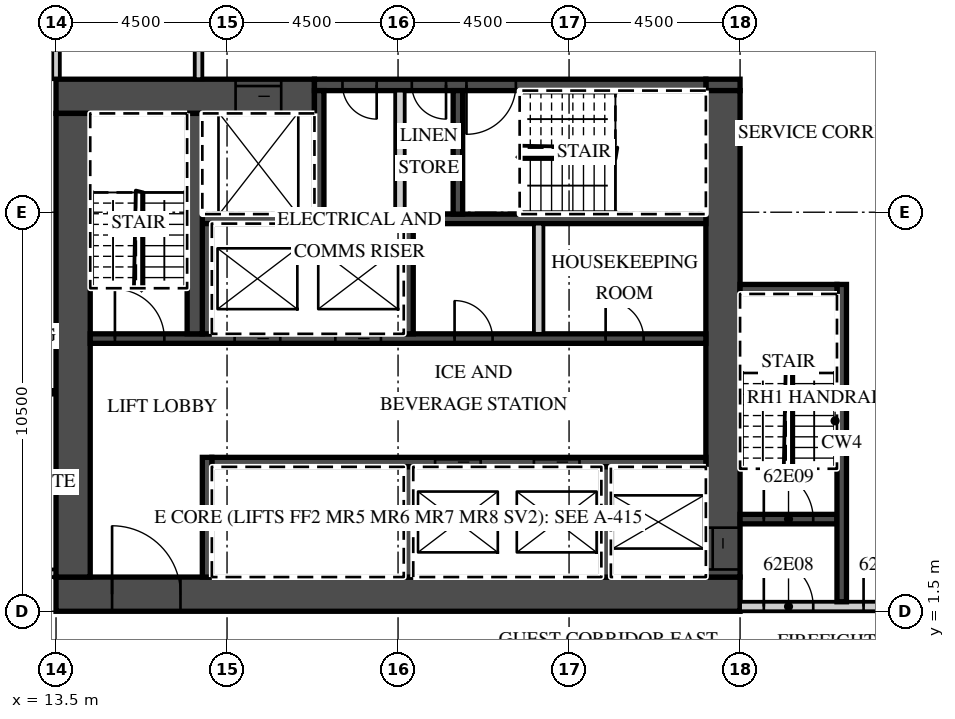
"""IFC4 building model, lengths in metres.
Left out: names, types, materials, properties, quantities, classifications, styles, units other than length and angle.
Written with IfcOpenShell. Run it as: python <this file> out.ifc"""

import sys

from ifc_helpers import new_model, si_unit, direction, frame, frame_2d, origin, place, context, subcontext, project, spatial, rectangle, extrude, element, fill, save


model = new_model("IFC4")
c1 = context("Model", 3, precision=1e-05, world=origin(), true_north=direction((0.0, 1.0)))
c2 = subcontext(c1, "Body", "Model", "MODEL_VIEW")
j1 = project(units=[si_unit("LENGTHUNIT", "METRE"), si_unit("PLANEANGLEUNIT", "RADIAN")], contexts=[c1])
p1 = place(None, origin())
s1 = spatial("IfcSite", under=j1, at=p1, CompositionType="ELEMENT")
p2 = place(p1, origin())
s2 = spatial("IfcBuilding", under=s1, at=p2, CompositionType="ELEMENT")
p3 = place(p2, frame((0.0, 0.0, 250.7)))
s3 = spatial("IfcBuildingStorey", under=s2, at=p3, CompositionType="ELEMENT", Elevation=250.7)
p4 = place(p3, frame((13.5, 15.5, 0.0), z_axis=(0.0, 0.0, 1.0), x_axis=(0.0, 1.0, 0.0)))
e1 = element("IfcWall", 1, at=p4, inside=s3, PredefinedType="PARTITIONING", context=c2, shape_type="SweptSolid", body=[
    extrude(rectangle(XDim=5.436, YDim=0.2, at=frame_2d((2.718, 0.0))), origin(), (0.0, 0.0, 1.0), 3.02),
])
p5 = place(p3, frame((-13.5, 2.5, 0.0), z_axis=(0.0, 0.0, 1.0), x_axis=(1.0, 0.0, 0.0)))
e2 = element("IfcWall", 2, at=p5, inside=s3, PredefinedType="PARTITIONING", context=c2, shape_type="SweptSolid", body=[
    extrude(rectangle(XDim=27.0, YDim=0.2, at=frame_2d((13.5, 0.0))), origin(), (0.0, 0.0, 1.0), 3.02),
])
p6 = place(p5, frame((0.575, 0.0, 0.0)))
e3 = element("IfcOpeningElement", 3, at=p6, cuts=e2, PredefinedType="OPENING", context=c2, shape_type="SweptSolid", body=[
    extrude(rectangle(XDim=1.0, YDim=2.1, at=frame_2d((0.5, 1.05))), frame((0.0, 0.11, 0.0), z_axis=(0.0, -1.0, 0.0), x_axis=(1.0, 0.0, 0.0)), (0.0, 0.0, 1.0), 0.22),
])
p7 = place(p5, frame((7.45, 0.0, 0.0)))
e4 = element("IfcOpeningElement", 4, at=p7, cuts=e2, PredefinedType="OPENING", context=c2, shape_type="SweptSolid", body=[
    extrude(rectangle(XDim=1.0, YDim=2.1, at=frame_2d((0.5, 1.05))), frame((0.0, 0.11, 0.0), z_axis=(0.0, -1.0, 0.0), x_axis=(1.0, 0.0, 0.0)), (0.0, 0.0, 1.0), 0.22),
])
p8 = place(p5, frame((11.925, 0.0, 0.0)))
e5 = element("IfcOpeningElement", 5, at=p8, cuts=e2, PredefinedType="OPENING", context=c2, shape_type="SweptSolid", body=[
    extrude(rectangle(XDim=1.0, YDim=2.1, at=frame_2d((0.5, 1.05))), frame((0.0, 0.11, 0.0), z_axis=(0.0, -1.0, 0.0), x_axis=(1.0, 0.0, 0.0)), (0.0, 0.0, 1.0), 0.22),
])
p9 = place(p5, frame((18.862, 0.0, 0.0)))
e6 = element("IfcOpeningElement", 6, at=p9, cuts=e2, PredefinedType="OPENING", context=c2, shape_type="SweptSolid", body=[
    extrude(rectangle(XDim=1.2, YDim=2.1, at=frame_2d((0.6, 1.05))), frame((0.0, 0.11, 0.0), z_axis=(0.0, -1.0, 0.0), x_axis=(1.0, 0.0, 0.0)), (0.0, 0.0, 1.0), 0.22),
])
p10 = place(p5, frame((23.075, 0.0, 0.0)))
e7 = element("IfcOpeningElement", 7, at=p10, cuts=e2, PredefinedType="OPENING", context=c2, shape_type="SweptSolid", body=[
    extrude(rectangle(XDim=1.0, YDim=2.1, at=frame_2d((0.5, 1.05))), frame((0.0, 0.11, 0.0), z_axis=(0.0, -1.0, 0.0), x_axis=(1.0, 0.0, 0.0)), (0.0, 0.0, 1.0), 0.22),
])
p11 = place(p3, frame((13.5, 1.95, 0.0), z_axis=(0.0, 0.0, 1.0), x_axis=(1.0, 0.0, 0.0)))
e8 = element("IfcWall", 8, at=p11, inside=s3, PredefinedType="SHEAR", context=c2, shape_type="SweptSolid", body=[
    extrude(rectangle(XDim=18.0, YDim=0.9, at=frame_2d((9.0, 0.0))), origin(), (0.0, 0.0, 1.0), 3.02),
])
p12 = place(p11, frame((1.475, 0.0, 0.0)))
e9 = element("IfcOpeningElement", 9, at=p12, cuts=e8, PredefinedType="OPENING", context=c2, shape_type="SweptSolid", body=[
    extrude(rectangle(XDim=1.8, YDim=2.1, at=frame_2d((0.9, 1.05))), frame((0.0, 0.46, 0.0), z_axis=(0.0, -1.0, 0.0), x_axis=(1.0, 0.0, 0.0)), (0.0, 0.0, 1.0), 0.92),
])
p13 = place(p3, frame((13.5, 15.05, 0.0), z_axis=(0.0, 0.0, 1.0), x_axis=(1.0, 0.0, 0.0)))
e10 = element("IfcWall", 10, at=p13, inside=s3, PredefinedType="SHEAR", context=c2, shape_type="SweptSolid", body=[
    extrude(rectangle(XDim=6.8, YDim=0.9, at=frame_2d((3.4, 0.0))), origin(), (0.0, 0.0, 1.0), 3.02),
])
p14 = place(p13, frame((4.725, 0.0, 0.0)))
e11 = element("IfcOpeningElement", 11, at=p14, cuts=e10, PredefinedType="OPENING", context=c2, shape_type="SweptSolid", body=[
    extrude(rectangle(XDim=1.2, YDim=2.1, at=frame_2d((0.6, 1.05))), frame((0.0, 0.46, 0.0), z_axis=(0.0, -1.0, 0.0), x_axis=(1.0, 0.0, 0.0)), (0.0, 0.0, 1.0), 0.92),
])
p15 = place(p3, frame((30.6, 15.35, 0.0), z_axis=(0.0, 0.0, 1.0), x_axis=(1.0, 0.0, 0.0)))
e12 = element("IfcWall", 12, at=p15, inside=s3, PredefinedType="SHEAR", context=c2, shape_type="SweptSolid", body=[
    extrude(rectangle(XDim=0.9, YDim=0.3, at=frame_2d((0.45, 0.0))), origin(), (0.0, 0.0, 1.0), 3.02),
])
p16 = place(p3, frame((20.3, 15.35, 0.0), z_axis=(0.0, 0.0, 1.0), x_axis=(1.0, 0.0, 0.0)))
e13 = element("IfcWall", 13, at=p16, inside=s3, PredefinedType="SHEAR", context=c2, shape_type="SweptSolid", body=[
    extrude(rectangle(XDim=10.3, YDim=0.3, at=frame_2d((5.15, 0.0))), origin(), (0.0, 0.0, 1.0), 3.02),
])
p17 = place(p16, frame((4.0, 0.0, 0.0)))
e14 = element("IfcOpeningElement", 14, at=p17, cuts=e13, PredefinedType="OPENING", context=c2, shape_type="SweptSolid", body=[
    extrude(rectangle(XDim=1.3, YDim=2.1, at=frame_2d((0.65, 1.05))), frame((0.0, 0.16, 0.0), z_axis=(0.0, -1.0, 0.0), x_axis=(1.0, 0.0, 0.0)), (0.0, 0.0, 1.0), 0.32),
])
p18 = place(p16, frame((2.562, 0.0, 0.0)))
e15 = element("IfcOpeningElement", 15, at=p18, cuts=e13, PredefinedType="OPENING", context=c2, shape_type="SweptSolid", body=[
    extrude(rectangle(XDim=0.9, YDim=2.1, at=frame_2d((0.45, 1.05))), frame((0.0, 0.16, 0.0), z_axis=(0.0, -1.0, 0.0), x_axis=(1.0, 0.0, 0.0)), (0.0, 0.0, 1.0), 0.32),
])
p19 = place(p16, frame((0.738, 0.0, 0.0)))
e16 = element("IfcOpeningElement", 16, at=p19, cuts=e13, PredefinedType="OPENING", context=c2, shape_type="SweptSolid", body=[
    extrude(rectangle(XDim=0.9, YDim=2.1, at=frame_2d((0.45, 1.05))), frame((0.0, 0.16, 0.0), z_axis=(0.0, -1.0, 0.0), x_axis=(1.0, 0.0, 0.0)), (0.0, 0.0, 1.0), 0.32),
])
p20 = place(p3, frame((31.05, 2.4, 0.0), z_axis=(0.0, 0.0, 1.0), x_axis=(0.0, 1.0, 0.0)))
e17 = element("IfcWall", 17, at=p20, inside=s3, PredefinedType="SHEAR", context=c2, shape_type="SweptSolid", body=[
    extrude(rectangle(XDim=12.8, YDim=0.9, at=frame_2d((6.4, 0.0))), origin(), (0.0, 0.0, 1.0), 3.02),
])
p21 = place(p20, frame((0.2, 0.0, 0.0)))
e18 = element("IfcOpeningElement", 18, at=p21, cuts=e17, PredefinedType="OPENING", context=c2, shape_type="SweptSolid", body=[
    extrude(rectangle(XDim=1.1, YDim=2.1, at=frame_2d((0.55, 1.05))), frame((0.0, 0.46, 0.0), z_axis=(0.0, -1.0, 0.0), x_axis=(1.0, 0.0, 0.0)), (0.0, 0.0, 1.0), 0.92),
])
p22 = place(p3, frame((13.95, 2.4, 0.0), z_axis=(0.0, 0.0, 1.0), x_axis=(0.0, 1.0, 0.0)))
e19 = element("IfcWall", 19, at=p22, inside=s3, PredefinedType="SHEAR", context=c2, shape_type="SweptSolid", body=[
    extrude(rectangle(XDim=12.2, YDim=0.9, at=frame_2d((6.1, 0.0))), origin(), (0.0, 0.0, 1.0), 3.02),
])
p23 = place(p3, frame((17.6, 5.425, 0.0), z_axis=(0.0, 0.0, 1.0), x_axis=(1.0, 0.0, 0.0)))
e20 = element("IfcWall", 20, at=p23, inside=s3, PredefinedType="SHEAR", context=c2, shape_type="SweptSolid", body=[
    extrude(rectangle(XDim=13.0, YDim=0.25, at=frame_2d((6.5, 0.0))), origin(), (0.0, 0.0, 1.0), 3.02),
])
p24 = place(p23, frame((8.475, 0.0, 0.0)))
e21 = element("IfcOpeningElement", 21, at=p24, cuts=e20, PredefinedType="OPENING", context=c2, shape_type="SweptSolid", body=[
    extrude(rectangle(XDim=1.2, YDim=2.1, at=frame_2d((0.6, 1.05))), frame((0.0, 0.135, 0.0), z_axis=(0.0, -1.0, 0.0), x_axis=(1.0, 0.0, 0.0)), (0.0, 0.0, 1.0), 0.27),
])
p25 = place(p23, frame((5.875, 0.0, 0.0)))
e22 = element("IfcOpeningElement", 22, at=p25, cuts=e20, PredefinedType="OPENING", context=c2, shape_type="SweptSolid", body=[
    extrude(rectangle(XDim=1.2, YDim=2.1, at=frame_2d((0.6, 1.05))), frame((0.0, 0.135, 0.0), z_axis=(0.0, -1.0, 0.0), x_axis=(1.0, 0.0, 0.0)), (0.0, 0.0, 1.0), 0.27),
])
p26 = place(p3, frame((17.475, 2.4, 0.0), z_axis=(0.0, 0.0, 1.0), x_axis=(0.0, 1.0, 0.0)))
e23 = element("IfcWall", 23, at=p26, inside=s3, PredefinedType="SHEAR", context=c2, shape_type="SweptSolid", body=[
    extrude(rectangle(XDim=3.15, YDim=0.25, at=frame_2d((1.575, 0.0))), origin(), (0.0, 0.0, 1.0), 3.02),
])
for number, where, z_axis, x_axis in (
    (24, (27.975, 2.4, 0.0), (0.0, 0.0, 1.0), (0.0, 1.0, 0.0)),
    (25, (22.775, 2.4, 0.0), (0.0, 0.0, 1.0), (0.0, 1.0, 0.0)),
):
    element("IfcWall", number, at=place(p3, frame(where, z_axis=z_axis, x_axis=x_axis)), inside=s3, PredefinedType="SHEAR", context=c2, shape_type="SweptSolid", body=[
        extrude(rectangle(XDim=2.9, YDim=0.25, at=frame_2d((1.45, 0.0))), origin(), (0.0, 0.0, 1.0), 3.02),
    ])
p27 = place(p3, frame((14.4, 8.675, 0.0), z_axis=(0.0, 0.0, 1.0), x_axis=(1.0, 0.0, 0.0)))
e26 = element("IfcWall", 26, at=p27, inside=s3, PredefinedType="SHEAR", context=c2, shape_type="SweptSolid", body=[
    extrude(rectangle(XDim=16.2, YDim=0.25, at=frame_2d((8.1, 0.0))), origin(), (0.0, 0.0, 1.0), 3.02),
])
p28 = place(p27, frame((6.45, 0.0, 0.0)))
e27 = element("IfcOpeningElement", 27, at=p28, cuts=e26, PredefinedType="OPENING", context=c2, shape_type="SweptSolid", body=[
    extrude(rectangle(XDim=1.2, YDim=2.1, at=frame_2d((0.6, 1.05))), frame((0.0, 0.135, 0.0), z_axis=(0.0, -1.0, 0.0), x_axis=(1.0, 0.0, 0.0)), (0.0, 0.0, 1.0), 0.27),
])
p29 = place(p27, frame((3.8, 0.0, 0.0)))
e28 = element("IfcOpeningElement", 28, at=p29, cuts=e26, PredefinedType="OPENING", context=c2, shape_type="SweptSolid", body=[
    extrude(rectangle(XDim=1.2, YDim=2.1, at=frame_2d((0.6, 1.05))), frame((0.0, 0.135, 0.0), z_axis=(0.0, -1.0, 0.0), x_axis=(1.0, 0.0, 0.0)), (0.0, 0.0, 1.0), 0.27),
])
p30 = place(p27, frame((0.65, 0.0, 0.0)))
e29 = element("IfcOpeningElement", 29, at=p30, cuts=e26, PredefinedType="OPENING", context=c2, shape_type="SweptSolid", body=[
    extrude(rectangle(XDim=1.3, YDim=2.1, at=frame_2d((0.65, 1.05))), frame((0.0, 0.135, 0.0), z_axis=(0.0, -1.0, 0.0), x_axis=(1.0, 0.0, 0.0)), (0.0, 0.0, 1.0), 0.27),
])
p31 = place(p27, frame((13.562, 0.0, 0.0)))
e30 = element("IfcOpeningElement", 30, at=p31, cuts=e26, PredefinedType="OPENING", context=c2, shape_type="SweptSolid", body=[
    extrude(rectangle(XDim=1.0, YDim=2.1, at=frame_2d((0.5, 1.05))), frame((0.0, 0.135, 0.0), z_axis=(0.0, -1.0, 0.0), x_axis=(1.0, 0.0, 0.0)), (0.0, 0.0, 1.0), 0.27),
])
p32 = place(p27, frame((9.587, 0.0, 0.0)))
e31 = element("IfcOpeningElement", 31, at=p32, cuts=e26, PredefinedType="OPENING", context=c2, shape_type="SweptSolid", body=[
    extrude(rectangle(XDim=1.0, YDim=2.1, at=frame_2d((0.5, 1.05))), frame((0.0, 0.135, 0.0), z_axis=(0.0, -1.0, 0.0), x_axis=(1.0, 0.0, 0.0)), (0.0, 0.0, 1.0), 0.27),
])
p33 = place(p3, frame((17.35, 11.825, 0.0), z_axis=(0.0, 0.0, 1.0), x_axis=(1.0, 0.0, 0.0)))
e32 = element("IfcWall", 32, at=p33, inside=s3, PredefinedType="SHEAR", context=c2, shape_type="SweptSolid", body=[
    extrude(rectangle(XDim=13.25, YDim=0.25, at=frame_2d((6.625, 0.0))), origin(), (0.0, 0.0, 1.0), 3.02),
])
for number, where, z_axis, x_axis in (
    (33, (17.475, 8.8, 0.0), (0.0, 0.0, 1.0), (0.0, 1.0, 0.0)),
    (34, (22.775, 8.8, 0.0), (0.0, 0.0, 1.0), (0.0, 1.0, 0.0)),
):
    element("IfcWall", number, at=place(p3, frame(where, z_axis=z_axis, x_axis=x_axis)), inside=s3, PredefinedType="SHEAR", context=c2, shape_type="SweptSolid", body=[
        extrude(rectangle(XDim=2.9, YDim=0.25, at=frame_2d((1.45, 0.0))), origin(), (0.0, 0.0, 1.0), 3.02),
    ])
p34 = place(p3, frame((26.2, 8.8, 0.0), z_axis=(0.0, 0.0, 1.0), x_axis=(0.0, 1.0, 0.0)))
e35 = element("IfcWall", 35, at=p34, inside=s3, PredefinedType="PARTITIONING", context=c2, shape_type="SweptSolid", body=[
    extrude(rectangle(XDim=2.9, YDim=0.25, at=frame_2d((1.45, 0.0))), origin(), (0.0, 0.0, 1.0), 3.02),
])
p35 = place(p3, frame((17.15, 8.8, 0.0), z_axis=(0.0, 0.0, 1.0), x_axis=(0.0, 1.0, 0.0)))
e36 = element("IfcWall", 36, at=p35, inside=s3, PredefinedType="SHEAR", context=c2, shape_type="SweptSolid", body=[
    extrude(rectangle(XDim=5.8, YDim=0.4, at=frame_2d((2.9, 0.0))), origin(), (0.0, 0.0, 1.0), 3.02),
])
for number, where, z_axis, x_axis in (
    (37, (20.425, 11.95, 0.0), (0.0, 0.0, 1.0), (0.0, 1.0, 0.0)),
    (38, (24.075, 11.95, 0.0), (0.0, 0.0, 1.0), (0.0, 1.0, 0.0)),
):
    element("IfcWall", number, at=place(p3, frame(where, z_axis=z_axis, x_axis=x_axis)), inside=s3, PredefinedType="SHEAR", context=c2, shape_type="SweptSolid", body=[
        extrude(rectangle(XDim=3.25, YDim=0.25, at=frame_2d((1.625, 0.0))), origin(), (0.0, 0.0, 1.0), 3.02),
    ])
p36 = place(p3, frame((22.55, 11.95, 0.0), z_axis=(0.0, 0.0, 1.0), x_axis=(0.0, 1.0, 0.0)))
e39 = element("IfcWall", 39, at=p36, inside=s3, PredefinedType="PARTITIONING", context=c2, shape_type="SweptSolid", body=[
    extrude(rectangle(XDim=3.25, YDim=0.25, at=frame_2d((1.625, 0.0))), origin(), (0.0, 0.0, 1.0), 3.02),
])
p37 = place(p3, frame((31.5, 1.625, 0.0), z_axis=(0.0, 0.0, 1.0), x_axis=(1.0, 0.0, 0.0)))
e40 = element("IfcWall", 40, at=p37, inside=s3, PredefinedType="PARTITIONING", context=c2, shape_type="SweptSolid", body=[
    extrude(rectangle(XDim=11.04, YDim=0.25, at=frame_2d((5.52, 0.0))), origin(), (0.0, 0.0, 1.0), 3.02),
])
p38 = place(p37, frame((0.625, 0.0, 0.0)))
e41 = element("IfcOpeningElement", 41, at=p38, cuts=e40, PredefinedType="OPENING", context=c2, shape_type="SweptSolid", body=[
    extrude(rectangle(XDim=1.3, YDim=2.1, at=frame_2d((0.65, 1.05))), frame((0.0, 0.135, 0.0), z_axis=(0.0, -1.0, 0.0), x_axis=(1.0, 0.0, 0.0)), (0.0, 0.0, 1.0), 0.27),
])
p39 = place(p37, frame((3.25, 0.0, 0.0)))
e42 = element("IfcOpeningElement", 42, at=p39, cuts=e40, PredefinedType="OPENING", context=c2, shape_type="SweptSolid", body=[
    extrude(rectangle(XDim=1.1, YDim=2.1, at=frame_2d((0.55, 1.05))), frame((0.0, 0.135, 0.0), z_axis=(0.0, -1.0, 0.0), x_axis=(1.0, 0.0, 0.0)), (0.0, 0.0, 1.0), 0.27),
])
p40 = place(p3, frame((31.5, 3.925, 0.0), z_axis=(0.0, 0.0, 1.0), x_axis=(1.0, 0.0, 0.0)))
e43 = element("IfcWall", 43, at=p40, inside=s3, PredefinedType="SHEAR", context=c2, shape_type="SweptSolid", body=[
    extrude(rectangle(XDim=2.55, YDim=0.25, at=frame_2d((1.275, 0.0))), origin(), (0.0, 0.0, 1.0), 3.02),
])
p41 = place(p40, frame((0.625, 0.0, 0.0)))
e44 = element("IfcOpeningElement", 44, at=p41, cuts=e43, PredefinedType="OPENING", context=c2, shape_type="SweptSolid", body=[
    extrude(rectangle(XDim=1.3, YDim=2.1, at=frame_2d((0.65, 1.05))), frame((0.0, 0.135, 0.0), z_axis=(0.0, -1.0, 0.0), x_axis=(1.0, 0.0, 0.0)), (0.0, 0.0, 1.0), 0.27),
])
p42 = place(p3, frame((34.175, 1.75, 0.0), z_axis=(0.0, 0.0, 1.0), x_axis=(0.0, 1.0, 0.0)))
e45 = element("IfcWall", 45, at=p42, inside=s3, PredefinedType="SHEAR", context=c2, shape_type="SweptSolid", body=[
    extrude(rectangle(XDim=8.35, YDim=0.25, at=frame_2d((4.175, 0.0))), origin(), (0.0, 0.0, 1.0), 3.02),
])
p43 = place(p3, frame((31.5, 9.975, 0.0), z_axis=(0.0, 0.0, 1.0), x_axis=(1.0, 0.0, 0.0)))
e46 = element("IfcWall", 46, at=p43, inside=s3, PredefinedType="SHEAR", context=c2, shape_type="SweptSolid", body=[
    extrude(rectangle(XDim=2.55, YDim=0.25, at=frame_2d((1.275, 0.0))), origin(), (0.0, 0.0, 1.0), 3.02),
])
p44 = place(p3, frame((17.25, 15.5, 0.0), z_axis=(0.0, 0.0, 1.0), x_axis=(0.0, 1.0, 0.0)))
e47 = element("IfcWall", 47, at=p44, inside=s3, PredefinedType="PARTITIONING", context=c2, shape_type="SweptSolid", body=[
    extrude(rectangle(XDim=2.2, YDim=0.2, at=frame_2d((1.1, 0.0))), origin(), (0.0, 0.0, 1.0), 3.02),
])
p45 = place(p28, origin())
e48 = element("IfcDoor", 48, at=p45, inside=s3, OperationType="SLIDING_TO_LEFT", PredefinedType="DOOR", context=c2, shape_type="SweptSolid", body=[
    extrude(rectangle(XDim=1.2, YDim=2.1, at=frame_2d((0.6, 1.05))), frame((0.0, 0.025, 0.0), z_axis=(0.0, -1.0, 0.0), x_axis=(1.0, 0.0, 0.0)), (0.0, 0.0, 1.0), 0.05),
])
fill(e27, e48)
p46 = place(p29, origin())
e49 = element("IfcDoor", 49, at=p46, inside=s3, OperationType="SLIDING_TO_RIGHT", PredefinedType="DOOR", context=c2, shape_type="SweptSolid", body=[
    extrude(rectangle(XDim=1.2, YDim=2.1, at=frame_2d((0.6, 1.05))), frame((0.0, 0.025, 0.0), z_axis=(0.0, -1.0, 0.0), x_axis=(1.0, 0.0, 0.0)), (0.0, 0.0, 1.0), 0.05),
])
fill(e28, e49)
p47 = place(p24, origin())
e50 = element("IfcDoor", 50, at=p47, inside=s3, OperationType="SLIDING_TO_LEFT", PredefinedType="DOOR", context=c2, shape_type="SweptSolid", body=[
    extrude(rectangle(XDim=1.2, YDim=2.1, at=frame_2d((0.6, 1.05))), frame((0.0, 0.025, 0.0), z_axis=(0.0, -1.0, 0.0), x_axis=(1.0, 0.0, 0.0)), (0.0, 0.0, 1.0), 0.05),
])
fill(e21, e50)
p48 = place(p25, origin())
e51 = element("IfcDoor", 51, at=p48, inside=s3, OperationType="SLIDING_TO_RIGHT", PredefinedType="DOOR", context=c2, shape_type="SweptSolid", body=[
    extrude(rectangle(XDim=1.2, YDim=2.1, at=frame_2d((0.6, 1.05))), frame((0.0, 0.025, 0.0), z_axis=(0.0, -1.0, 0.0), x_axis=(1.0, 0.0, 0.0)), (0.0, 0.0, 1.0), 0.05),
])
fill(e22, e51)
p49 = place(p14, origin())
e52 = element("IfcDoor", 52, at=p49, inside=s3, OperationType="SLIDING_TO_LEFT", PredefinedType="DOOR", context=c2, shape_type="SweptSolid", body=[
    extrude(rectangle(XDim=1.2, YDim=2.1, at=frame_2d((0.6, 1.05))), frame((0.0, 0.025, 0.0), z_axis=(0.0, -1.0, 0.0), x_axis=(1.0, 0.0, 0.0)), (0.0, 0.0, 1.0), 0.05),
])
fill(e11, e52)
p50 = place(p21, origin())
e53 = element("IfcDoor", 53, at=p50, inside=s3, OperationType="SLIDING_TO_LEFT", PredefinedType="DOOR", context=c2, shape_type="SweptSolid", body=[
    extrude(rectangle(XDim=1.1, YDim=2.1, at=frame_2d((0.55, 1.05))), frame((0.0, 0.025, 0.0), z_axis=(0.0, -1.0, 0.0), x_axis=(1.0, 0.0, 0.0)), (0.0, 0.0, 1.0), 0.05),
])
fill(e18, e53)
p51 = place(p12, origin())
e54 = element("IfcDoor", 54, at=p51, inside=s3, OperationType="DOUBLE_DOOR_DOUBLE_SWING", PredefinedType="DOOR", context=c2, shape_type="SweptSolid", body=[
    extrude(rectangle(XDim=1.8, YDim=2.1, at=frame_2d((0.9, 1.05))), frame((0.0, 0.025, 0.0), z_axis=(0.0, -1.0, 0.0), x_axis=(1.0, 0.0, 0.0)), (0.0, 0.0, 1.0), 0.05),
])
fill(e9, e54)
p52 = place(p38, origin())
e55 = element("IfcDoor", 55, at=p52, inside=s3, OperationType="SINGLE_SWING_LEFT", PredefinedType="DOOR", context=c2, shape_type="SweptSolid", body=[
    extrude(rectangle(XDim=1.3, YDim=2.1, at=frame_2d((0.65, 1.05))), frame((0.0, 0.025, 0.0), z_axis=(0.0, -1.0, 0.0), x_axis=(1.0, 0.0, 0.0)), (0.0, 0.0, 1.0), 0.05),
])
fill(e41, e55)
p53 = place(p41, origin())
e56 = element("IfcDoor", 56, at=p53, inside=s3, OperationType="SINGLE_SWING_LEFT", PredefinedType="DOOR", context=c2, shape_type="SweptSolid", body=[
    extrude(rectangle(XDim=1.3, YDim=2.1, at=frame_2d((0.65, 1.05))), frame((0.0, 0.025, 0.0), z_axis=(0.0, -1.0, 0.0), x_axis=(1.0, 0.0, 0.0)), (0.0, 0.0, 1.0), 0.05),
])
fill(e44, e56)
p54 = place(p39, origin())
e57 = element("IfcDoor", 57, at=p54, inside=s3, OperationType="SINGLE_SWING_LEFT", PredefinedType="DOOR", context=c2, shape_type="SweptSolid", body=[
    extrude(rectangle(XDim=1.1, YDim=2.1, at=frame_2d((0.55, 1.05))), frame((0.0, 0.025, 0.0), z_axis=(0.0, -1.0, 0.0), x_axis=(1.0, 0.0, 0.0)), (0.0, 0.0, 1.0), 0.05),
])
fill(e42, e57)
p55 = place(p30, origin())
e58 = element("IfcDoor", 58, at=p55, inside=s3, OperationType="SINGLE_SWING_LEFT", PredefinedType="DOOR", context=c2, shape_type="SweptSolid", body=[
    extrude(rectangle(XDim=1.3, YDim=2.1, at=frame_2d((0.65, 1.05))), frame((0.0, 0.025, 0.0), z_axis=(0.0, -1.0, 0.0), x_axis=(1.0, 0.0, 0.0)), (0.0, 0.0, 1.0), 0.05),
])
fill(e29, e58)
p56 = place(p17, origin())
e59 = element("IfcDoor", 59, at=p56, inside=s3, OperationType="SINGLE_SWING_LEFT", PredefinedType="DOOR", context=c2, shape_type="SweptSolid", body=[
    extrude(rectangle(XDim=1.3, YDim=2.1, at=frame_2d((0.65, 1.05))), frame((0.0, 0.025, 0.0), z_axis=(0.0, -1.0, 0.0), x_axis=(1.0, 0.0, 0.0)), (0.0, 0.0, 1.0), 0.05),
])
fill(e14, e59)
p57 = place(p18, origin())
e60 = element("IfcDoor", 60, at=p57, inside=s3, OperationType="SINGLE_SWING_RIGHT", PredefinedType="DOOR", context=c2, shape_type="SweptSolid", body=[
    extrude(rectangle(XDim=0.9, YDim=2.1, at=frame_2d((0.45, 1.05))), frame((0.0, 0.025, 0.0), z_axis=(0.0, -1.0, 0.0), x_axis=(1.0, 0.0, 0.0)), (0.0, 0.0, 1.0), 0.05),
])
fill(e15, e60)
p58 = place(p19, origin())
e61 = element("IfcDoor", 61, at=p58, inside=s3, OperationType="SINGLE_SWING_RIGHT", PredefinedType="DOOR", context=c2, shape_type="SweptSolid", body=[
    extrude(rectangle(XDim=0.9, YDim=2.1, at=frame_2d((0.45, 1.05))), frame((0.0, 0.025, 0.0), z_axis=(0.0, -1.0, 0.0), x_axis=(1.0, 0.0, 0.0)), (0.0, 0.0, 1.0), 0.05),
])
fill(e16, e61)
p59 = place(p31, origin())
e62 = element("IfcDoor", 62, at=p59, inside=s3, OperationType="SINGLE_SWING_LEFT", PredefinedType="DOOR", context=c2, shape_type="SweptSolid", body=[
    extrude(rectangle(XDim=1.0, YDim=2.1, at=frame_2d((0.5, 1.05))), frame((0.0, 0.025, 0.0), z_axis=(0.0, -1.0, 0.0), x_axis=(1.0, 0.0, 0.0)), (0.0, 0.0, 1.0), 0.05),
])
fill(e30, e62)
p60 = place(p32, origin())
e63 = element("IfcDoor", 63, at=p60, inside=s3, OperationType="SINGLE_SWING_LEFT", PredefinedType="DOOR", context=c2, shape_type="SweptSolid", body=[
    extrude(rectangle(XDim=1.0, YDim=2.1, at=frame_2d((0.5, 1.05))), frame((0.0, 0.025, 0.0), z_axis=(0.0, -1.0, 0.0), x_axis=(1.0, 0.0, 0.0)), (0.0, 0.0, 1.0), 0.05),
])
fill(e31, e63)
save(model, sys.argv[1])
